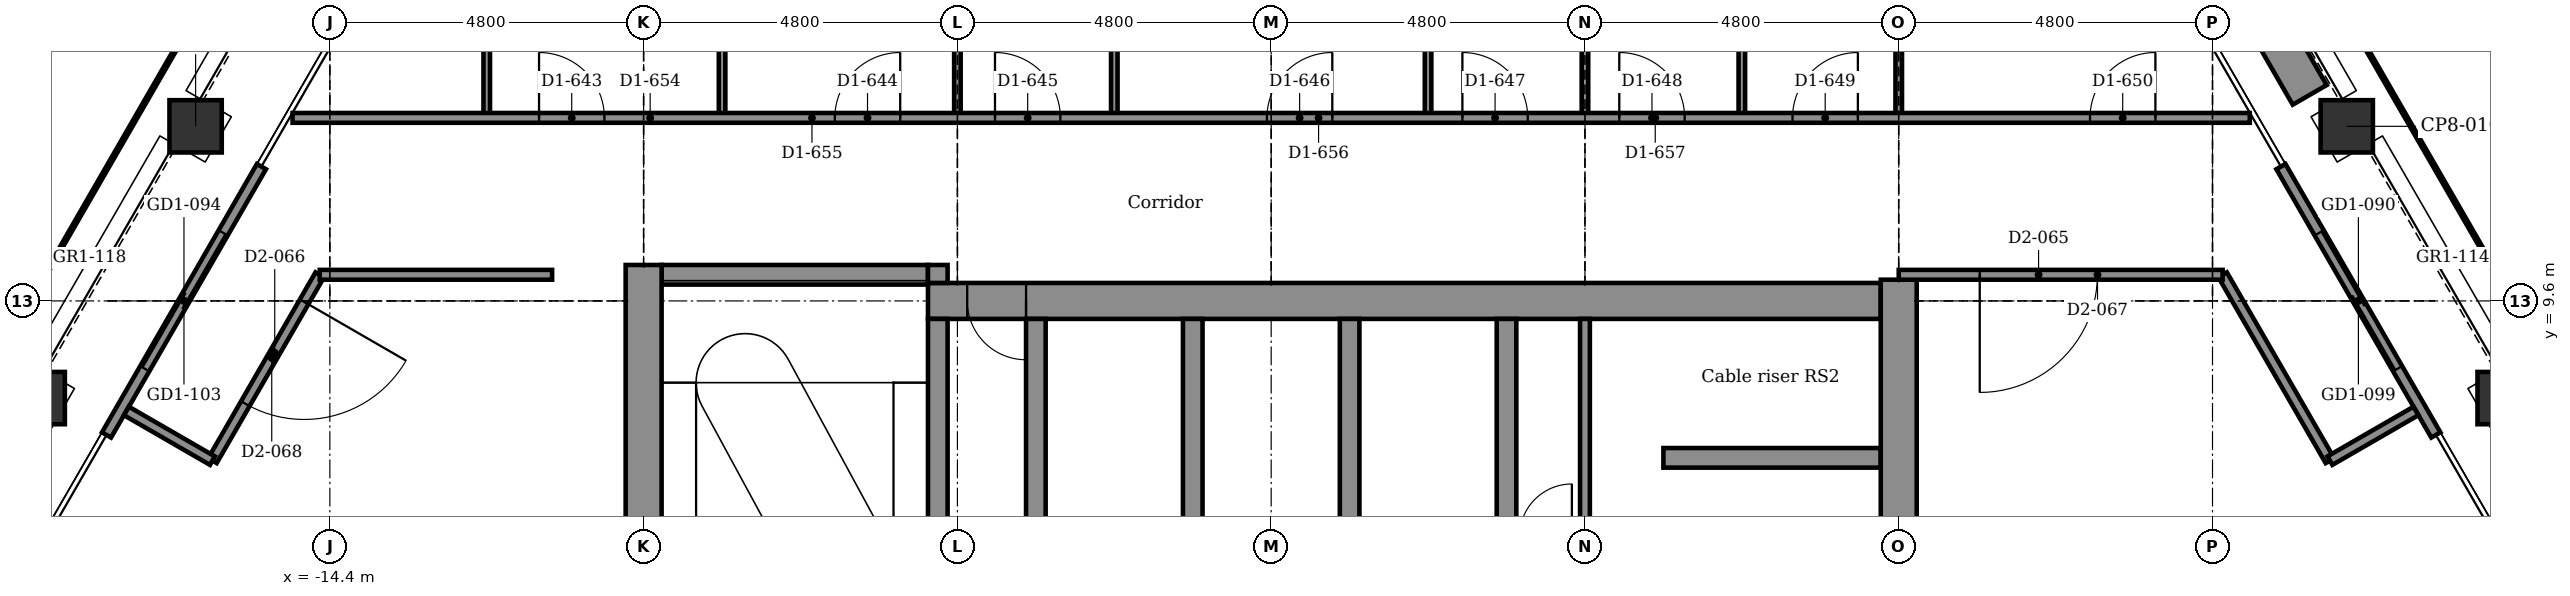
"""IFC4 building model, lengths in metres.
Left out: names, types, materials, properties, quantities, classifications, styles, units other than length and angle.
Written with IfcOpenShell. Run it as: python <this file> out.ifc"""

import sys

from ifc_helpers import new_model, si_unit, direction, frame, frame_2d, origin, origin_2d, place, context, subcontext, project, spatial, rectangle, extrude, element, fill, save


model = new_model("IFC4")
c1 = context("Model", 3, precision=1e-05, world=origin(), true_north=direction((0.0, 1.0)))
c2 = subcontext(c1, "Body", "Model", "MODEL_VIEW")
j1 = project(units=[si_unit("LENGTHUNIT", "METRE"), si_unit("PLANEANGLEUNIT", "RADIAN")], contexts=[c1])
p1 = place(None, origin())
s1 = spatial("IfcSite", under=j1, at=p1, CompositionType="ELEMENT")
p2 = place(p1, origin())
s2 = spatial("IfcBuilding", under=s1, at=p2, CompositionType="ELEMENT")
p3 = place(p2, frame((0.0, 0.0, 226.7)))
s3 = spatial("IfcBuildingStorey", under=s2, at=p3, CompositionType="ELEMENT", Elevation=226.7)
for number, where, z_axis, x_axis in (
    (1, (16.454, 12.271, -0.15), (0.0, 0.0, 1.0), (0.866, 0.5, 0.0)),
    (2, (18.854, 8.114, -0.15), (0.0, 0.0, 1.0), (0.866, 0.5, 0.0)),
    (3, (-18.854, 8.114, -0.15), (0.0, 0.0, 1.0), (0.5, 0.866, 0.0)),
    (4, (-16.454, 12.271, -0.15), (0.0, 0.0, 1.0), (0.5, 0.866, 0.0)),
):
    element("IfcColumn", number, at=place(p3, frame(where, z_axis=z_axis, x_axis=x_axis)), inside=s3, PredefinedType="COLUMN", context=c2, shape_type="SweptSolid", body=[
        extrude(rectangle(XDim=0.8, YDim=0.8, at=origin_2d()), origin(), (0.0, 0.0, 1.0), 3.9),
    ])
p4 = place(p3, frame((6.0, 7.2, -0.15), z_axis=(0.0, 0.0, 1.0), x_axis=(1.0, 0.0, 0.0)))
e5 = element("IfcWall", 5, at=p4, inside=s3, PredefinedType="STANDARD", context=c2, shape_type="SweptSolid", body=[
    extrude(rectangle(XDim=3.325, YDim=0.3, at=frame_2d((1.663, 0.0))), origin(), (0.0, 0.0, 1.0), 3.9),
])
p5 = place(p3, frame((-5.25, 9.6, -0.15), z_axis=(0.0, 0.0, 1.0), x_axis=(1.0, 0.0, 0.0)))
e6 = element("IfcWall", 6, at=p5, inside=s3, PredefinedType="SHEAR", context=c2, shape_type="SweptSolid", body=[
    extrude(rectangle(XDim=14.575, YDim=0.55, at=frame_2d((7.288, 0.0))), origin(), (0.0, 0.0, 1.0), 3.9),
])
p6 = place(p5, frame((0.6, 0.0, 0.15)))
e7 = element("IfcOpeningElement", 7, at=p6, cuts=e6, PredefinedType="OPENING", context=c2, shape_type="SweptSolid", body=[
    extrude(rectangle(XDim=0.9, YDim=2.1, at=frame_2d((0.45, 1.05))), frame((0.0, 0.285, 0.0), z_axis=(0.0, -1.0, 0.0), x_axis=(1.0, 0.0, 0.0)), (0.0, 0.0, 1.0), 0.57),
])
p7 = place(p3, frame((-9.325, 10.0, -0.15), z_axis=(0.0, 0.0, 1.0), x_axis=(1.0, 0.0, 0.0)))
e8 = element("IfcWall", 8, at=p7, inside=s3, PredefinedType="STANDARD", context=c2, shape_type="SweptSolid", body=[
    extrude(rectangle(XDim=4.075, YDim=0.3, at=frame_2d((2.038, 0.0))), origin(), (0.0, 0.0, 1.0), 3.9),
])
p8 = place(p3, frame((-9.6, 2.55, -0.15), z_axis=(0.0, 0.0, 1.0), x_axis=(0.0, 1.0, 0.0)))
e9 = element("IfcWall", 9, at=p8, inside=s3, PredefinedType="SHEAR", context=c2, shape_type="SweptSolid", body=[
    extrude(rectangle(XDim=7.6, YDim=0.55, at=frame_2d((3.8, 0.0))), origin(), (0.0, 0.0, 1.0), 3.9),
])
p9 = place(p3, frame((-5.1, 2.25, -0.15), z_axis=(0.0, 0.0, 1.0), x_axis=(0.0, 1.0, 0.0)))
e10 = element("IfcWall", 10, at=p9, inside=s3, PredefinedType="STANDARD", context=c2, shape_type="SweptSolid", body=[
    extrude(rectangle(XDim=7.075, YDim=0.3, at=frame_2d((3.538, 0.0))), origin(), (0.0, 0.0, 1.0), 3.9),
])
p10 = place(p9, frame((2.0, 0.0, 0.15)))
e11 = element("IfcOpeningElement", 11, at=p10, cuts=e10, PredefinedType="OPENING", context=c2, shape_type="SweptSolid", body=[
    extrude(rectangle(XDim=1.2, YDim=2.1, at=frame_2d((0.6, 1.05))), frame((0.0, 0.16, 0.0), z_axis=(0.0, -1.0, 0.0), x_axis=(1.0, 0.0, 0.0)), (0.0, 0.0, 1.0), 0.32),
])
p11 = place(p3, frame((-5.1, 9.875, -0.15), z_axis=(0.0, 0.0, 1.0), x_axis=(0.0, 1.0, 0.0)))
e12 = element("IfcWall", 12, at=p11, inside=s3, PredefinedType="STANDARD", context=c2, shape_type="SweptSolid", body=[
    extrude(rectangle(XDim=0.275, YDim=0.3, at=frame_2d((0.137, 0.0))), origin(), (0.0, 0.0, 1.0), 3.9),
])
for number, where, z_axis, x_axis in (
    (13, (-3.6, 5.85, -0.15), (0.0, 0.0, 1.0), (0.0, 1.0, 0.0)),
    (14, (-1.2, 5.85, -0.15), (0.0, 0.0, 1.0), (0.0, 1.0, 0.0)),
    (15, (1.2, 5.85, -0.15), (0.0, 0.0, 1.0), (0.0, 1.0, 0.0)),
    (16, (3.6, 5.85, -0.15), (0.0, 0.0, 1.0), (0.0, 1.0, 0.0)),
):
    element("IfcWall", number, at=place(p3, frame(where, z_axis=z_axis, x_axis=x_axis)), inside=s3, PredefinedType="STANDARD", context=c2, shape_type="SweptSolid", body=[
        extrude(rectangle(XDim=3.475, YDim=0.3, at=frame_2d((1.737, 0.0))), origin(), (0.0, 0.0, 1.0), 3.9),
    ])
p12 = place(p3, frame((9.6, -10.15, -0.15), z_axis=(0.0, 0.0, 1.0), x_axis=(0.0, 1.0, 0.0)))
e17 = element("IfcWall", 17, at=p12, inside=s3, PredefinedType="SHEAR", context=c2, shape_type="SweptSolid", body=[
    extrude(rectangle(XDim=20.075, YDim=0.55, at=frame_2d((10.038, 0.0))), origin(), (0.0, 0.0, 1.0), 3.9),
])
p13 = place(p3, frame((15.447, 11.655, 0.0), z_axis=(0.0, 0.0, 1.0), x_axis=(0.499978080042, -0.866038058908, 0.0)))
e18 = element("IfcWall", 18, at=p13, inside=s3, PredefinedType="PARTITIONING", context=c2, shape_type="SweptSolid", body=[
    extrude(rectangle(XDim=4.74, YDim=0.16, at=frame_2d((2.37, 0.0))), origin(), (0.0, 0.0, 1.0), 3.75),
])
p14 = place(p13, frame((1.17, 0.0, 0.0)))
e19 = element("IfcOpeningElement", 19, at=p14, cuts=e18, PredefinedType="OPENING", context=c2, shape_type="SweptSolid", body=[
    extrude(rectangle(XDim=2.4, YDim=2.4, at=frame_2d((1.2, 1.2))), frame((0.0, 0.09, 0.0), z_axis=(0.0, -1.0, 0.0), x_axis=(1.0, 0.0, 0.0)), (0.0, 0.0, 1.0), 0.18),
])
p15 = place(p3, frame((-17.817, 7.55, 0.0), z_axis=(0.0, 0.0, 1.0), x_axis=(0.499978080042, 0.866038058908, 0.0)))
e20 = element("IfcWall", 20, at=p15, inside=s3, PredefinedType="PARTITIONING", context=c2, shape_type="SweptSolid", body=[
    extrude(rectangle(XDim=4.74, YDim=0.16, at=frame_2d((2.37, 0.0))), origin(), (0.0, 0.0, 1.0), 3.75),
])
p16 = place(p15, frame((1.17, 0.0, 0.0)))
e21 = element("IfcOpeningElement", 21, at=p16, cuts=e20, PredefinedType="OPENING", context=c2, shape_type="SweptSolid", body=[
    extrude(rectangle(XDim=2.4, YDim=2.4, at=frame_2d((1.2, 1.2))), frame((0.0, 0.09, 0.0), z_axis=(0.0, -1.0, 0.0), x_axis=(1.0, 0.0, 0.0)), (0.0, 0.0, 1.0), 0.18),
])
p17 = place(p3, frame((14.187, 15.697, 0.0), z_axis=(0.0, 0.0, 1.0), x_axis=(0.499977295307, -0.866038511948, 0.0)))
e22 = element("IfcWall", 22, at=p17, inside=s3, PredefinedType="USERDEFINED", context=c2, shape_type="SweptSolid", body=[
    extrude(rectangle(XDim=3.4, YDim=0.6, at=frame_2d((1.7, 0.0))), origin(), (0.0, 0.0, 1.0), 0.7),
])
p18 = place(p3, frame((9.6, 12.4, 0.0), z_axis=(0.0, 0.0, 1.0), x_axis=(0.0, 1.0, 0.0)))
e23 = element("IfcWall", 23, at=p18, inside=s3, PredefinedType="PARTITIONING", context=c2, shape_type="SweptSolid", body=[
    extrude(rectangle(XDim=6.715, YDim=0.1, at=frame_2d((3.357, 0.0))), origin(), (0.0, 0.0, 1.0), 3.217),
])
p19 = place(p3, frame((7.2, 12.4, 0.0), z_axis=(0.0, 0.0, 1.0), x_axis=(0.0, 1.0, 0.0)))
e24 = element("IfcWall", 24, at=p19, inside=s3, PredefinedType="PARTITIONING", context=c2, shape_type="SweptSolid", body=[
    extrude(rectangle(XDim=6.715, YDim=0.1, at=frame_2d((3.357, 0.0))), origin(), (0.0, 0.0, 1.0), 3.75),
])
p20 = place(p3, frame((4.8, 12.4, 0.0), z_axis=(0.0, 0.0, 1.0), x_axis=(0.0, 1.0, 0.0)))
e25 = element("IfcWall", 25, at=p20, inside=s3, PredefinedType="PARTITIONING", context=c2, shape_type="SweptSolid", body=[
    extrude(rectangle(XDim=6.715, YDim=0.1, at=frame_2d((3.357, 0.0))), origin(), (0.0, 0.0, 1.0), 3.217),
])
p21 = place(p3, frame((4.8, 6.0, 0.0), z_axis=(0.0, 0.0, 1.0), x_axis=(0.0, 1.0, 0.0)))
e26 = element("IfcWall", 26, at=p21, inside=s3, PredefinedType="PARTITIONING", context=c2, shape_type="SweptSolid", body=[
    extrude(rectangle(XDim=3.325, YDim=0.15, at=frame_2d((1.663, 0.0))), origin(), (0.0, 0.0, 1.0), 3.75),
])
for number, where, z_axis, x_axis in (
    (27, (2.4, 12.4, 0.0), (0.0, 0.0, 1.0), (0.0, 1.0, 0.0)),
    (28, (-2.4, 12.4, 0.0), (0.0, 0.0, 1.0), (0.0, 1.0, 0.0)),
):
    element("IfcWall", number, at=place(p3, frame(where, z_axis=z_axis, x_axis=x_axis)), inside=s3, PredefinedType="PARTITIONING", context=c2, shape_type="SweptSolid", body=[
        extrude(rectangle(XDim=6.725, YDim=0.1, at=frame_2d((3.362, 0.0))), origin(), (0.0, 0.0, 1.0), 3.75),
    ])
p22 = place(p3, frame((-4.8, 12.4, 0.0), z_axis=(0.0, 0.0, 1.0), x_axis=(0.0, 1.0, 0.0)))
e29 = element("IfcWall", 29, at=p22, inside=s3, PredefinedType="PARTITIONING", context=c2, shape_type="SweptSolid", body=[
    extrude(rectangle(XDim=3.6, YDim=0.1, at=frame_2d((1.8, 0.0))), origin(), (0.0, 0.0, 1.0), 3.217),
])
for number, where, z_axis, x_axis in (
    (30, (-8.4, 12.4, 0.0), (0.0, 0.0, 1.0), (0.0, 1.0, 0.0)),
    (31, (-12.0, 12.4, 0.0), (0.0, 0.0, 1.0), (0.0, 1.0, 0.0)),
):
    element("IfcWall", number, at=place(p3, frame(where, z_axis=z_axis, x_axis=x_axis)), inside=s3, PredefinedType="PARTITIONING", context=c2, shape_type="SweptSolid", body=[
        extrude(rectangle(XDim=3.6, YDim=0.1, at=frame_2d((1.8, 0.0))), origin(), (0.0, 0.0, 1.0), 3.75),
    ])
p23 = place(p3, frame((14.555, 10.0, 0.0), z_axis=(0.0, 0.0, 1.0), x_axis=(0.499954196102, -0.866051847062, 0.0)))
e32 = element("IfcWall", 32, at=p23, inside=s3, PredefinedType="PARTITIONING", context=c2, shape_type="SweptSolid", body=[
    extrude(rectangle(XDim=3.283, YDim=0.15, at=frame_2d((1.642, 0.0))), origin(), (0.0, 0.0, 1.0), 3.75),
])
p24 = place(p3, frame((-16.196, 7.157, 0.0), z_axis=(0.0, 0.0, 1.0), x_axis=(0.499954196102, 0.866051847062, 0.0)))
e33 = element("IfcWall", 33, at=p24, inside=s3, PredefinedType="PARTITIONING", context=c2, shape_type="SweptSolid", body=[
    extrude(rectangle(XDim=3.283, YDim=0.15, at=frame_2d((1.642, 0.0))), origin(), (0.0, 0.0, 1.0), 3.75),
])
p25 = place(p24, frame((1.006, 0.0, 0.0)))
e34 = element("IfcOpeningElement", 34, at=p25, cuts=e33, PredefinedType="OPENING", context=c2, shape_type="SweptSolid", body=[
    extrude(rectangle(XDim=1.8, YDim=2.1, at=frame_2d((0.9, 1.05))), frame((0.0, 0.085, 0.0), z_axis=(0.0, -1.0, 0.0), x_axis=(1.0, 0.0, 0.0)), (0.0, 0.0, 1.0), 0.17),
])
for number, where, z_axis, x_axis in (
    (35, (-17.512, 7.917, 0.0), (0.0, 0.0, 1.0), (0.866, -0.5, 0.0)),
    (36, (16.196, 7.157, 0.0), (0.0, 0.0, 1.0), (0.866, 0.5, 0.0)),
):
    element("IfcWall", number, at=place(p3, frame(where, z_axis=z_axis, x_axis=x_axis)), inside=s3, PredefinedType="PARTITIONING", context=c2, shape_type="SweptSolid", body=[
        extrude(rectangle(XDim=1.52, YDim=0.15, at=frame_2d((0.76, 0.0))), origin(), (0.0, 0.0, 1.0), 3.75),
    ])
p26 = place(p3, frame((-14.555, 10.0, 0.0), z_axis=(0.0, 0.0, 1.0), x_axis=(1.0, 0.0, 0.0)))
e37 = element("IfcWall", 37, at=p26, inside=s3, PredefinedType="PARTITIONING", context=c2, shape_type="SweptSolid", body=[
    extrude(rectangle(XDim=3.555, YDim=0.15, at=frame_2d((1.777, 0.0))), origin(), (0.0, 0.0, 1.0), 3.75),
])
p27 = place(p3, frame((9.6, 10.0, 0.0), z_axis=(0.0, 0.0, 1.0), x_axis=(1.0, 0.0, 0.0)))
e38 = element("IfcWall", 38, at=p27, inside=s3, PredefinedType="PARTITIONING", context=c2, shape_type="SweptSolid", body=[
    extrude(rectangle(XDim=4.955, YDim=0.15, at=frame_2d((2.477, 0.0))), origin(), (0.0, 0.0, 1.0), 3.75),
])
p28 = place(p27, frame((1.239, 0.0, 0.0)))
e39 = element("IfcOpeningElement", 39, at=p28, cuts=e38, PredefinedType="OPENING", context=c2, shape_type="SweptSolid", body=[
    extrude(rectangle(XDim=1.8, YDim=2.1, at=frame_2d((0.9, 1.05))), frame((0.0, 0.085, 0.0), z_axis=(0.0, -1.0, 0.0), x_axis=(1.0, 0.0, 0.0)), (0.0, 0.0, 1.0), 0.17),
])
p29 = place(p3, frame((-14.97, 12.4, 0.0), z_axis=(0.0, 0.0, 1.0), x_axis=(1.0, 0.0, 0.0)))
e40 = element("IfcWall", 40, at=p29, inside=s3, PredefinedType="PARTITIONING", context=c2, shape_type="SweptSolid", body=[
    extrude(rectangle(XDim=29.94, YDim=0.15, at=frame_2d((14.97, 0.0))), origin(), (0.0, 0.0, 1.0), 3.75),
])
p30 = place(p29, frame((3.77, 0.0, 0.0)))
e41 = element("IfcOpeningElement", 41, at=p30, cuts=e40, PredefinedType="OPENING", context=c2, shape_type="SweptSolid", body=[
    extrude(rectangle(XDim=1.0, YDim=2.1, at=frame_2d((0.5, 1.05))), frame((0.0, 0.085, 0.0), z_axis=(0.0, -1.0, 0.0), x_axis=(1.0, 0.0, 0.0)), (0.0, 0.0, 1.0), 0.17),
])
p31 = place(p29, frame((8.295, 0.0, 0.0)))
e42 = element("IfcOpeningElement", 42, at=p31, cuts=e40, PredefinedType="OPENING", context=c2, shape_type="SweptSolid", body=[
    extrude(rectangle(XDim=1.0, YDim=2.1, at=frame_2d((0.5, 1.05))), frame((0.0, 0.085, 0.0), z_axis=(0.0, -1.0, 0.0), x_axis=(1.0, 0.0, 0.0)), (0.0, 0.0, 1.0), 0.17),
])
p32 = place(p29, frame((10.745, 0.0, 0.0)))
e43 = element("IfcOpeningElement", 43, at=p32, cuts=e40, PredefinedType="OPENING", context=c2, shape_type="SweptSolid", body=[
    extrude(rectangle(XDim=1.0, YDim=2.1, at=frame_2d((0.5, 1.05))), frame((0.0, 0.085, 0.0), z_axis=(0.0, -1.0, 0.0), x_axis=(1.0, 0.0, 0.0)), (0.0, 0.0, 1.0), 0.17),
])
p33 = place(p29, frame((14.905, 0.0, 0.0)))
e44 = element("IfcOpeningElement", 44, at=p33, cuts=e40, PredefinedType="OPENING", context=c2, shape_type="SweptSolid", body=[
    extrude(rectangle(XDim=1.0, YDim=2.1, at=frame_2d((0.5, 1.05))), frame((0.0, 0.085, 0.0), z_axis=(0.0, -1.0, 0.0), x_axis=(1.0, 0.0, 0.0)), (0.0, 0.0, 1.0), 0.17),
])
p34 = place(p29, frame((17.895, 0.0, 0.0)))
e45 = element("IfcOpeningElement", 45, at=p34, cuts=e40, PredefinedType="OPENING", context=c2, shape_type="SweptSolid", body=[
    extrude(rectangle(XDim=1.0, YDim=2.1, at=frame_2d((0.5, 1.05))), frame((0.0, 0.085, 0.0), z_axis=(0.0, -1.0, 0.0), x_axis=(1.0, 0.0, 0.0)), (0.0, 0.0, 1.0), 0.17),
])
p35 = place(p29, frame((20.295, 0.0, 0.0)))
e46 = element("IfcOpeningElement", 46, at=p35, cuts=e40, PredefinedType="OPENING", context=c2, shape_type="SweptSolid", body=[
    extrude(rectangle(XDim=1.0, YDim=2.1, at=frame_2d((0.5, 1.05))), frame((0.0, 0.085, 0.0), z_axis=(0.0, -1.0, 0.0), x_axis=(1.0, 0.0, 0.0)), (0.0, 0.0, 1.0), 0.17),
])
p36 = place(p29, frame((22.945, 0.0, 0.0)))
e47 = element("IfcOpeningElement", 47, at=p36, cuts=e40, PredefinedType="OPENING", context=c2, shape_type="SweptSolid", body=[
    extrude(rectangle(XDim=1.0, YDim=2.1, at=frame_2d((0.5, 1.05))), frame((0.0, 0.085, 0.0), z_axis=(0.0, -1.0, 0.0), x_axis=(1.0, 0.0, 0.0)), (0.0, 0.0, 1.0), 0.17),
])
p37 = place(p29, frame((27.497, 0.0, 0.0)))
e48 = element("IfcOpeningElement", 48, at=p37, cuts=e40, PredefinedType="OPENING", context=c2, shape_type="SweptSolid", body=[
    extrude(rectangle(XDim=1.0, YDim=2.1, at=frame_2d((0.5, 1.05))), frame((0.0, 0.085, 0.0), z_axis=(0.0, -1.0, 0.0), x_axis=(1.0, 0.0, 0.0)), (0.0, 0.0, 1.0), 0.17),
])
p38 = place(p14, origin())
e49 = element("IfcDoor", 49, at=p38, inside=s3, OperationType="DOUBLE_DOOR_SLIDING", PredefinedType="DOOR", context=c2, shape_type="SweptSolid", body=[
    extrude(rectangle(XDim=2.4, YDim=2.4, at=frame_2d((1.2, 1.2))), frame((0.0, 0.025, 0.0), z_axis=(0.0, -1.0, 0.0), x_axis=(1.0, 0.0, 0.0)), (0.0, 0.0, 1.0), 0.05),
])
fill(e19, e49)
p39 = place(p16, origin())
e50 = element("IfcDoor", 50, at=p39, inside=s3, OperationType="DOUBLE_DOOR_SLIDING", PredefinedType="DOOR", context=c2, shape_type="SweptSolid", body=[
    extrude(rectangle(XDim=2.4, YDim=2.4, at=frame_2d((1.2, 1.2))), frame((0.0, 0.025, 0.0), z_axis=(0.0, -1.0, 0.0), x_axis=(1.0, 0.0, 0.0)), (0.0, 0.0, 1.0), 0.05),
])
fill(e21, e50)
p40 = place(p30, origin())
e51 = element("IfcDoor", 51, at=p40, inside=s3, OperationType="SINGLE_SWING_LEFT", PredefinedType="DOOR", context=c2, shape_type="SweptSolid", body=[
    extrude(rectangle(XDim=1.0, YDim=2.1, at=frame_2d((0.5, 1.05))), frame((0.0, 0.025, 0.0), z_axis=(0.0, -1.0, 0.0), x_axis=(1.0, 0.0, 0.0)), (0.0, 0.0, 1.0), 0.05),
])
fill(e41, e51)
p41 = place(p31, origin())
e52 = element("IfcDoor", 52, at=p41, inside=s3, OperationType="SINGLE_SWING_RIGHT", PredefinedType="DOOR", context=c2, shape_type="SweptSolid", body=[
    extrude(rectangle(XDim=1.0, YDim=2.1, at=frame_2d((0.5, 1.05))), frame((0.0, 0.025, 0.0), z_axis=(0.0, -1.0, 0.0), x_axis=(1.0, 0.0, 0.0)), (0.0, 0.0, 1.0), 0.05),
])
fill(e42, e52)
p42 = place(p32, origin())
e53 = element("IfcDoor", 53, at=p42, inside=s3, OperationType="SINGLE_SWING_LEFT", PredefinedType="DOOR", context=c2, shape_type="SweptSolid", body=[
    extrude(rectangle(XDim=1.0, YDim=2.1, at=frame_2d((0.5, 1.05))), frame((0.0, 0.025, 0.0), z_axis=(0.0, -1.0, 0.0), x_axis=(1.0, 0.0, 0.0)), (0.0, 0.0, 1.0), 0.05),
])
fill(e43, e53)
p43 = place(p33, origin())
e54 = element("IfcDoor", 54, at=p43, inside=s3, OperationType="SINGLE_SWING_RIGHT", PredefinedType="DOOR", context=c2, shape_type="SweptSolid", body=[
    extrude(rectangle(XDim=1.0, YDim=2.1, at=frame_2d((0.5, 1.05))), frame((0.0, 0.025, 0.0), z_axis=(0.0, -1.0, 0.0), x_axis=(1.0, 0.0, 0.0)), (0.0, 0.0, 1.0), 0.05),
])
fill(e44, e54)
p44 = place(p34, origin())
e55 = element("IfcDoor", 55, at=p44, inside=s3, OperationType="SINGLE_SWING_LEFT", PredefinedType="DOOR", context=c2, shape_type="SweptSolid", body=[
    extrude(rectangle(XDim=1.0, YDim=2.1, at=frame_2d((0.5, 1.05))), frame((0.0, 0.025, 0.0), z_axis=(0.0, -1.0, 0.0), x_axis=(1.0, 0.0, 0.0)), (0.0, 0.0, 1.0), 0.05),
])
fill(e45, e55)
p45 = place(p35, origin())
e56 = element("IfcDoor", 56, at=p45, inside=s3, OperationType="SINGLE_SWING_LEFT", PredefinedType="DOOR", context=c2, shape_type="SweptSolid", body=[
    extrude(rectangle(XDim=1.0, YDim=2.1, at=frame_2d((0.5, 1.05))), frame((0.0, 0.025, 0.0), z_axis=(0.0, -1.0, 0.0), x_axis=(1.0, 0.0, 0.0)), (0.0, 0.0, 1.0), 0.05),
])
fill(e46, e56)
p46 = place(p36, origin())
e57 = element("IfcDoor", 57, at=p46, inside=s3, OperationType="SINGLE_SWING_RIGHT", PredefinedType="DOOR", context=c2, shape_type="SweptSolid", body=[
    extrude(rectangle(XDim=1.0, YDim=2.1, at=frame_2d((0.5, 1.05))), frame((0.0, 0.025, 0.0), z_axis=(0.0, -1.0, 0.0), x_axis=(1.0, 0.0, 0.0)), (0.0, 0.0, 1.0), 0.05),
])
fill(e47, e57)
p47 = place(p37, origin())
e58 = element("IfcDoor", 58, at=p47, inside=s3, OperationType="SINGLE_SWING_RIGHT", PredefinedType="DOOR", context=c2, shape_type="SweptSolid", body=[
    extrude(rectangle(XDim=1.0, YDim=2.1, at=frame_2d((0.5, 1.05))), frame((0.0, 0.025, 0.0), z_axis=(0.0, -1.0, 0.0), x_axis=(1.0, 0.0, 0.0)), (0.0, 0.0, 1.0), 0.05),
])
fill(e48, e58)
p48 = place(p28, frame((1.8, 0.0, 0.0), z_axis=(0.0, 0.0, 1.0), x_axis=(-1.0, 0.0, 0.0)))
e59 = element("IfcDoor", 59, at=p48, inside=s3, OperationType="SINGLE_SWING_LEFT", PredefinedType="DOOR", context=c2, shape_type="SweptSolid", body=[
    extrude(rectangle(XDim=1.8, YDim=2.1, at=frame_2d((0.9, 1.05))), frame((0.0, 0.025, 0.0), z_axis=(0.0, -1.0, 0.0), x_axis=(1.0, 0.0, 0.0)), (0.0, 0.0, 1.0), 0.05),
])
fill(e39, e59)
p49 = place(p25, frame((1.8, 0.0, 0.0), z_axis=(0.0, 0.0, 1.0), x_axis=(-1.0, 0.0, 0.0)))
e60 = element("IfcDoor", 60, at=p49, inside=s3, OperationType="SINGLE_SWING_RIGHT", PredefinedType="DOOR", context=c2, shape_type="SweptSolid", body=[
    extrude(rectangle(XDim=1.8, YDim=2.1, at=frame_2d((0.9, 1.05))), frame((0.0, 0.025, 0.0), z_axis=(0.0, -1.0, 0.0), x_axis=(1.0, 0.0, 0.0)), (0.0, 0.0, 1.0), 0.05),
])
fill(e34, e60)
p50 = place(p6, frame((0.9, 0.0, 0.0), z_axis=(0.0, 0.0, 1.0), x_axis=(-1.0, 0.0, 0.0)))
e61 = element("IfcDoor", 61, at=p50, inside=s3, OperationType="SINGLE_SWING_RIGHT", PredefinedType="DOOR", context=c2, shape_type="SweptSolid", body=[
    extrude(rectangle(XDim=0.9, YDim=2.1, at=frame_2d((0.45, 1.05))), frame((0.0, 0.025, 0.0), z_axis=(0.0, -1.0, 0.0), x_axis=(1.0, 0.0, 0.0)), (0.0, 0.0, 1.0), 0.05),
])
fill(e7, e61)
save(model, sys.argv[1])
